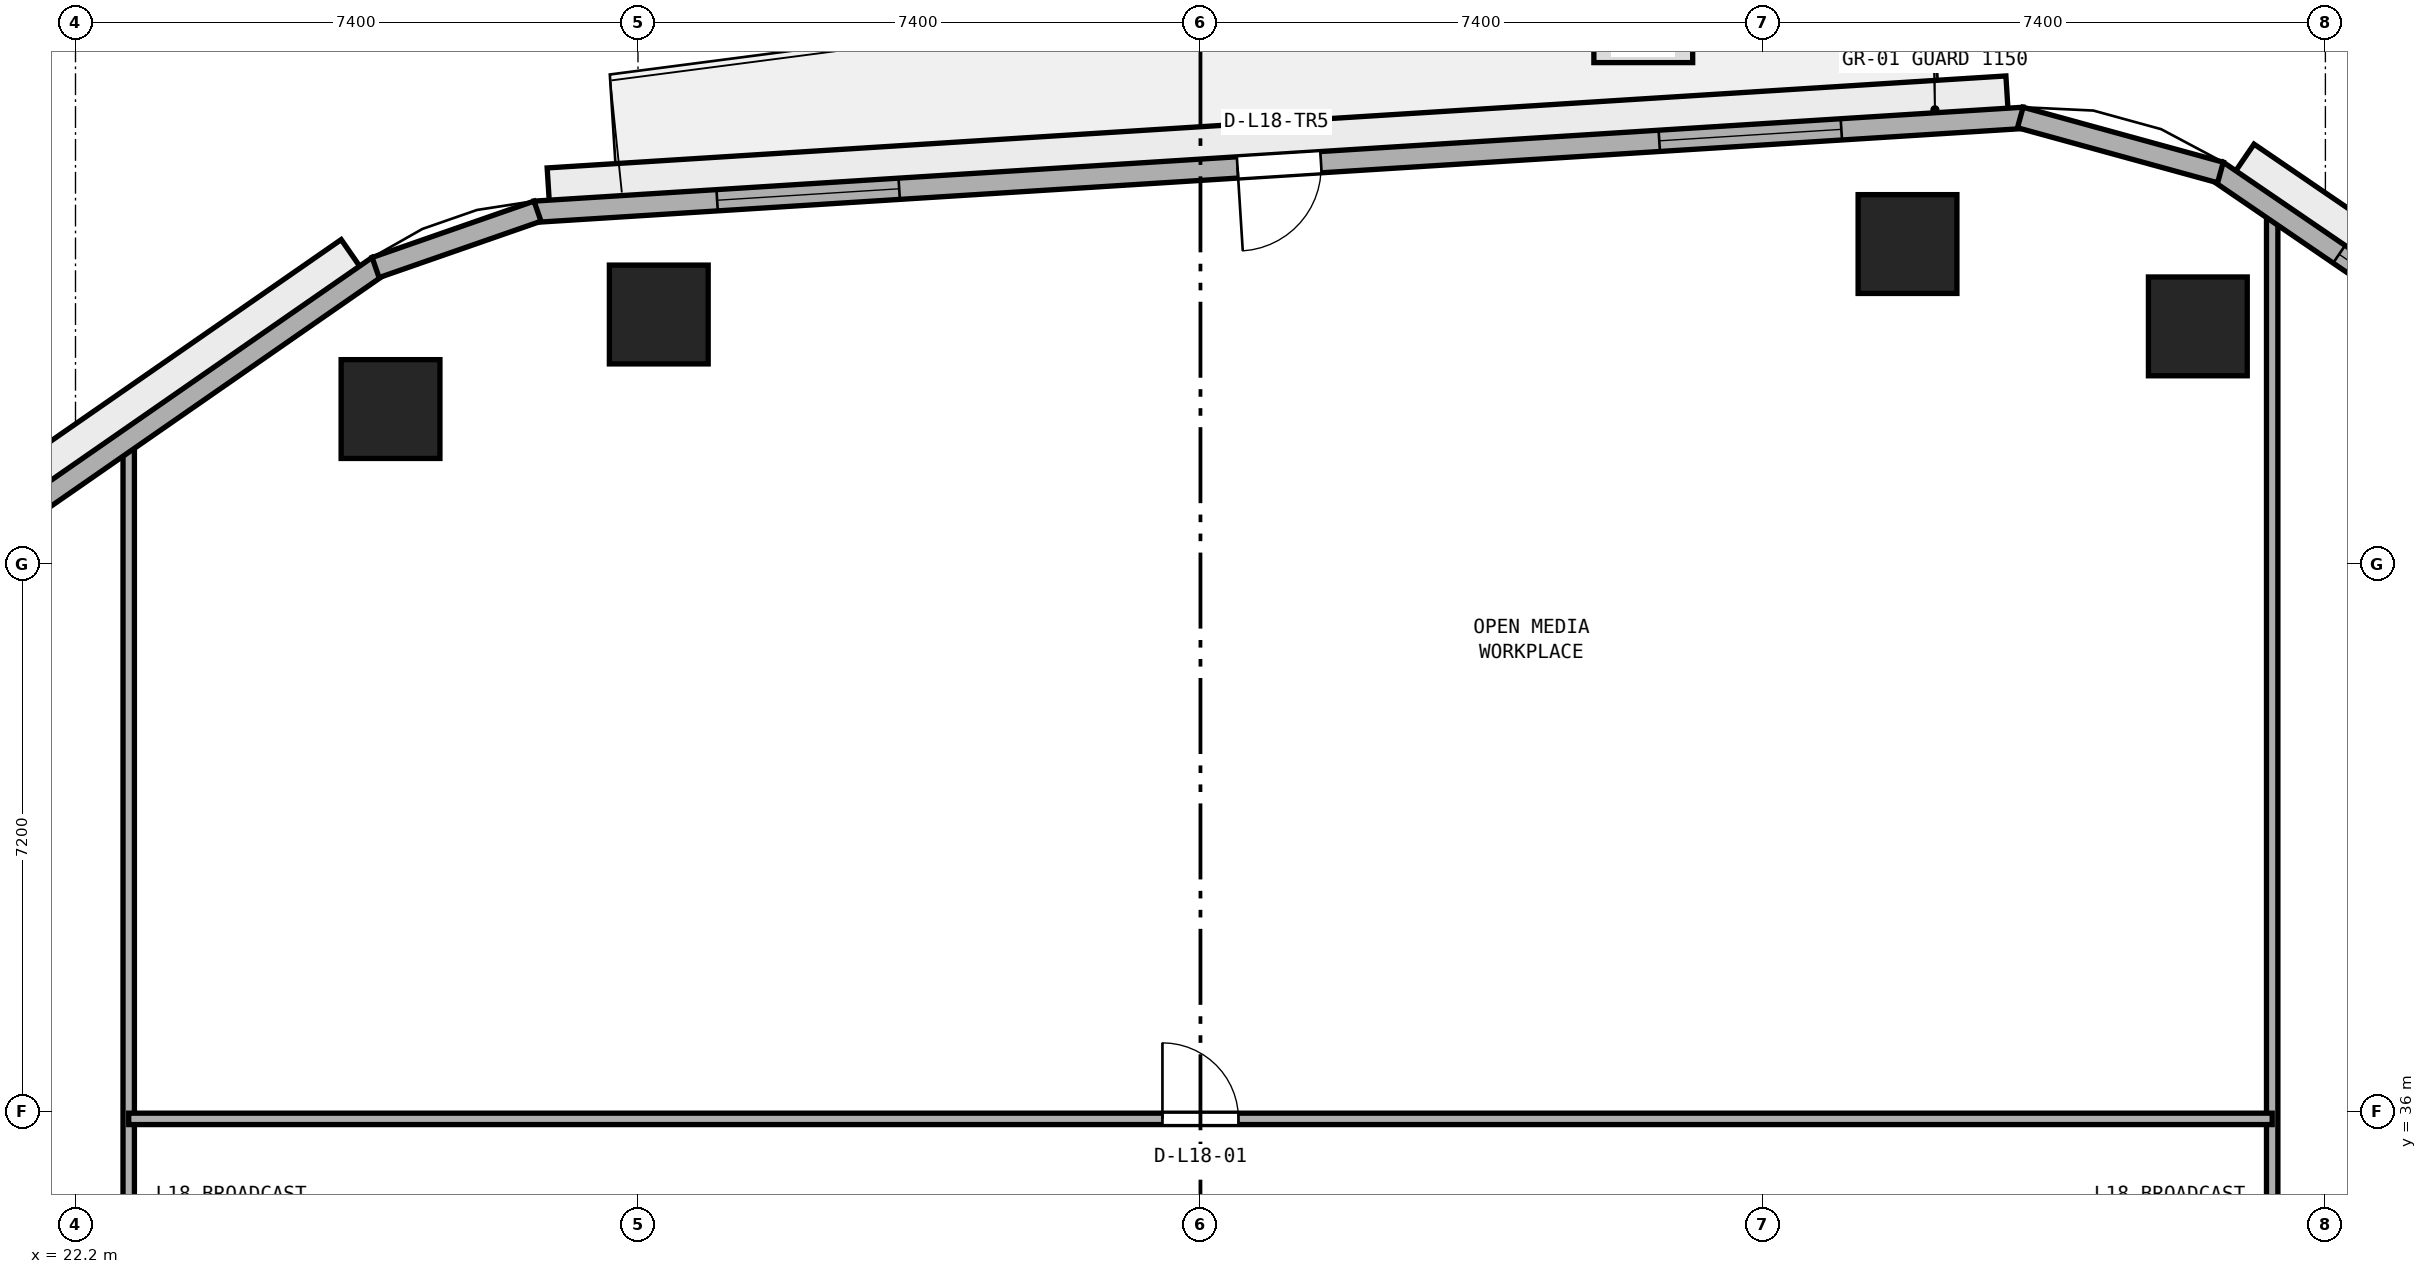
"""IFC4 building model, lengths in metres.
Left out: names, types, materials, properties, quantities, classifications, styles, units other than length and angle.
Written with IfcOpenShell. Run it as: python <this file> out.ifc"""

import sys

from ifc_helpers import new_model, si_unit, direction, frame, frame_2d, origin, origin_2d, place, context, subcontext, project, spatial, rectangle, extrude, element, fill, save


model = new_model("IFC4")
c1 = context("Model", 3, precision=1e-05, world=origin(), true_north=direction((0.0, 1.0)))
c2 = subcontext(c1, "Body", "Model", "MODEL_VIEW")
j1 = project(units=[si_unit("LENGTHUNIT", "METRE"), si_unit("PLANEANGLEUNIT", "RADIAN")], contexts=[c1])
p1 = place(None, origin())
s1 = spatial("IfcSite", under=j1, at=p1, CompositionType="ELEMENT")
p2 = place(p1, origin())
s2 = spatial("IfcBuilding", under=s1, at=p2, CompositionType="ELEMENT")
p3 = place(p2, frame((0.0, 0.0, 74.4)))
s3 = spatial("IfcBuildingStorey", under=s2, at=p3, CompositionType="ELEMENT", Elevation=74.4)
for number, where, z_axis, x_axis in (
    (1, (50.122, 46.326, 0.0), (0.0, 0.0, 1.0), (1.0, 0.0, 0.0)),
    (2, (46.302, 47.409, 0.0), (0.0, 0.0, 1.0), (1.0, 0.0, 0.0)),
    (3, (29.874, 46.482, 0.0), (0.0, 0.0, 1.0), (1.0, 0.0, 0.0)),
    (4, (26.344, 45.238, 0.0), (0.0, 0.0, 1.0), (1.0, 0.0, 0.0)),
):
    element("IfcColumn", number, at=place(p3, frame(where, z_axis=z_axis, x_axis=x_axis)), inside=s3, PredefinedType="COLUMN", context=c2, shape_type="SweptSolid", body=[
        extrude(rectangle(XDim=1.3, YDim=1.3, at=origin_2d()), origin(), (0.0, 0.0, 1.0), 3.8),
    ])
p4 = place(p3, frame((51.1, 2.651, 0.0), z_axis=(0.0, 0.0, 1.0), x_axis=(0.0, 1.0, 0.0)))
e5 = element("IfcWall", 5, at=p4, inside=s3, PredefinedType="PARTITIONING", context=c2, shape_type="SweptSolid", body=[
    extrude(rectangle(XDim=45.255, YDim=0.15, at=frame_2d((22.627, 0.0))), origin(), (0.0, 0.0, 1.0), 3.525),
])
p5 = place(p4, frame((15.699, 0.0, 0.0)))
e6 = element("IfcOpeningElement", 6, at=p5, cuts=e5, PredefinedType="OPENING", context=c2, shape_type="SweptSolid", body=[
    extrude(rectangle(XDim=0.9, YDim=2.1, at=frame_2d((0.45, 1.05))), frame((0.0, 0.085, 0.0), z_axis=(0.0, -1.0, 0.0), x_axis=(1.0, 0.0, 0.0)), (0.0, 0.0, 1.0), 0.17),
])
p6 = place(p4, frame((26.349, 0.0, 0.0)))
e7 = element("IfcOpeningElement", 7, at=p6, cuts=e5, PredefinedType="OPENING", context=c2, shape_type="SweptSolid", body=[
    extrude(rectangle(XDim=1.0, YDim=2.12, at=frame_2d((0.5, 1.06))), frame((0.0, 0.085, 0.0), z_axis=(0.0, -1.0, 0.0), x_axis=(1.0, 0.0, 0.0)), (0.0, 0.0, 1.0), 0.17),
])
p7 = place(p3, frame((22.9, 5.316, 0.0), z_axis=(0.0, 0.0, 1.0), x_axis=(0.0, 1.0, 0.0)))
e8 = element("IfcWall", 8, at=p7, inside=s3, PredefinedType="PARTITIONING", context=c2, shape_type="SweptSolid", body=[
    extrude(rectangle(XDim=39.555, YDim=0.15, at=frame_2d((19.777, 0.0))), origin(), (0.0, 0.0, 1.0), 3.525),
])
p8 = place(p7, frame((12.135, 0.0, 0.0)))
e9 = element("IfcOpeningElement", 9, at=p8, cuts=e8, PredefinedType="OPENING", context=c2, shape_type="SweptSolid", body=[
    extrude(rectangle(XDim=0.9, YDim=2.1, at=frame_2d((0.45, 1.05))), frame((0.0, 0.085, 0.0), z_axis=(0.0, -1.0, 0.0), x_axis=(1.0, 0.0, 0.0)), (0.0, 0.0, 1.0), 0.17),
])
p9 = place(p7, frame((22.834, 0.0, 0.0)))
e10 = element("IfcOpeningElement", 10, at=p9, cuts=e8, PredefinedType="OPENING", context=c2, shape_type="SweptSolid", body=[
    extrude(rectangle(XDim=0.9, YDim=2.1, at=frame_2d((0.45, 1.05))), frame((0.0, 0.085, 0.0), z_axis=(0.0, -1.0, 0.0), x_axis=(1.0, 0.0, 0.0)), (0.0, 0.0, 1.0), 0.17),
])
p10 = place(p3, frame((22.9, 35.9, 0.0), z_axis=(0.0, 0.0, 1.0), x_axis=(1.0, 0.0, 0.0)))
e11 = element("IfcWall", 11, at=p10, inside=s3, PredefinedType="PARTITIONING", context=c2, shape_type="SweptSolid", body=[
    extrude(rectangle(XDim=28.2, YDim=0.15, at=frame_2d((14.1, 0.0))), origin(), (0.0, 0.0, 1.0), 3.525),
])
p11 = place(p10, frame((13.6, 0.0, 0.0)))
e12 = element("IfcOpeningElement", 12, at=p11, cuts=e11, PredefinedType="OPENING", context=c2, shape_type="SweptSolid", body=[
    extrude(rectangle(XDim=1.0, YDim=2.12, at=frame_2d((0.5, 1.06))), frame((0.0, 0.085, 0.0), z_axis=(0.0, -1.0, 0.0), x_axis=(1.0, 0.0, 0.0)), (0.0, 0.0, 1.0), 0.17),
])
p12 = place(p3, frame((64.29, 38.867, 0.0), z_axis=(0.0, 0.0, 1.0), x_axis=(-0.825755550159, 0.564028165416, 0.0)))
e13 = element("IfcWall", 13, at=p12, inside=s3, PredefinedType="STANDARD", context=c2, shape_type="SweptSolid", body=[
    extrude(rectangle(XDim=16.848, YDim=0.28, at=frame_2d((8.424, 0.0))), origin(), (0.0, 0.0, 1.0), 3.525),
])
p13 = place(p12, frame((1.941, 0.0, 0.9)))
e14 = element("IfcOpeningElement", 14, at=p13, cuts=e13, PredefinedType="OPENING", context=c2, shape_type="SweptSolid", body=[
    extrude(rectangle(XDim=2.4, YDim=1.75, at=frame_2d((1.2, 0.875))), frame((0.0, 0.15, 0.0), z_axis=(0.0, -1.0, 0.0), x_axis=(1.0, 0.0, 0.0)), (0.0, 0.0, 1.0), 0.3),
])
p14 = place(p12, frame((7.224, 0.0, 0.9)))
e15 = element("IfcOpeningElement", 15, at=p14, cuts=e13, PredefinedType="OPENING", context=c2, shape_type="SweptSolid", body=[
    extrude(rectangle(XDim=2.4, YDim=1.75, at=frame_2d((1.2, 0.875))), frame((0.0, 0.15, 0.0), z_axis=(0.0, -1.0, 0.0), x_axis=(1.0, 0.0, 0.0)), (0.0, 0.0, 1.0), 0.3),
])
p15 = place(p12, frame((12.507, 0.0, 0.9)))
e16 = element("IfcOpeningElement", 16, at=p15, cuts=e13, PredefinedType="OPENING", context=c2, shape_type="SweptSolid", body=[
    extrude(rectangle(XDim=2.4, YDim=1.75, at=frame_2d((1.2, 0.875))), frame((0.0, 0.15, 0.0), z_axis=(0.0, -1.0, 0.0), x_axis=(1.0, 0.0, 0.0)), (0.0, 0.0, 1.0), 0.3),
])
p16 = place(p3, frame((47.832, 49.069, 0.0), z_axis=(0.0, 0.0, 1.0), x_axis=(-0.998017725054, -0.062933460723, 0.0)))
e17 = element("IfcWall", 17, at=p16, inside=s3, PredefinedType="STANDARD", context=c2, shape_type="SweptSolid", body=[
    extrude(rectangle(XDim=19.629, YDim=0.28, at=frame_2d((9.815, 0.0))), origin(), (0.0, 0.0, 1.0), 3.525),
])
p17 = place(p16, frame((9.265, 0.0, 0.0)))
e18 = element("IfcOpeningElement", 18, at=p17, cuts=e17, PredefinedType="OPENING", context=c2, shape_type="SweptSolid", body=[
    extrude(rectangle(XDim=1.1, YDim=2.2, at=frame_2d((0.55, 1.1))), frame((0.0, 0.15, 0.0), z_axis=(0.0, -1.0, 0.0), x_axis=(1.0, 0.0, 0.0)), (0.0, 0.0, 1.0), 0.3),
])
p18 = place(p16, frame((2.405, 0.0, 0.9)))
e19 = element("IfcOpeningElement", 19, at=p18, cuts=e17, PredefinedType="OPENING", context=c2, shape_type="SweptSolid", body=[
    extrude(rectangle(XDim=2.4, YDim=1.75, at=frame_2d((1.2, 0.875))), frame((0.0, 0.15, 0.0), z_axis=(0.0, -1.0, 0.0), x_axis=(1.0, 0.0, 0.0)), (0.0, 0.0, 1.0), 0.3),
])
p19 = place(p16, frame((14.825, 0.0, 0.9)))
e20 = element("IfcOpeningElement", 20, at=p19, cuts=e17, PredefinedType="OPENING", context=c2, shape_type="SweptSolid", body=[
    extrude(rectangle(XDim=2.4, YDim=1.75, at=frame_2d((1.2, 0.875))), frame((0.0, 0.15, 0.0), z_axis=(0.0, -1.0, 0.0), x_axis=(1.0, 0.0, 0.0)), (0.0, 0.0, 1.0), 0.3),
])
p20 = place(p3, frame((26.182, 47.118, 0.0), z_axis=(0.0, 0.0, 1.0), x_axis=(-0.821547956627, -0.570139417127, 0.0)))
e21 = element("IfcWall", 21, at=p20, inside=s3, PredefinedType="STANDARD", context=c2, shape_type="SweptSolid", body=[
    extrude(rectangle(XDim=18.132, YDim=0.28, at=frame_2d((9.066, 0.0))), origin(), (0.0, 0.0, 1.0), 3.525),
])
p21 = place(p20, frame((7.866, 0.0, 0.9)))
e22 = element("IfcOpeningElement", 22, at=p21, cuts=e21, PredefinedType="OPENING", context=c2, shape_type="SweptSolid", body=[
    extrude(rectangle(XDim=2.4, YDim=1.75, at=frame_2d((1.2, 0.875))), frame((0.0, 0.15, 0.0), z_axis=(0.0, -1.0, 0.0), x_axis=(1.0, 0.0, 0.0)), (0.0, 0.0, 1.0), 0.3),
])
p22 = place(p20, frame((13.577, 0.0, 0.9)))
e23 = element("IfcOpeningElement", 23, at=p22, cuts=e21, PredefinedType="OPENING", context=c2, shape_type="SweptSolid", body=[
    extrude(rectangle(XDim=2.4, YDim=1.75, at=frame_2d((1.2, 0.875))), frame((0.0, 0.15, 0.0), z_axis=(0.0, -1.0, 0.0), x_axis=(1.0, 0.0, 0.0)), (0.0, 0.0, 1.0), 0.3),
])
p23 = place(p3, frame((50.419, 48.351, 0.0), z_axis=(0.0, 0.0, 1.0), x_axis=(-0.964254516967, 0.264977784933, 0.0)))
e24 = element("IfcWall", 24, at=p23, inside=s3, PredefinedType="STANDARD", context=c2, shape_type="SweptSolid", body=[
    extrude(rectangle(XDim=2.731, YDim=0.28, at=frame_2d((1.365, 0.0))), origin(), (0.0, 0.0, 1.0), 3.525),
])
p24 = place(p3, frame((28.278, 47.842, 0.0), z_axis=(0.0, 0.0, 1.0), x_axis=(-0.9444559001, -0.328638179106, 0.0)))
e25 = element("IfcWall", 25, at=p24, inside=s3, PredefinedType="STANDARD", context=c2, shape_type="SweptSolid", body=[
    extrude(rectangle(XDim=2.255, YDim=0.28, at=frame_2d((1.128, 0.0))), origin(), (0.0, 0.0, 1.0), 3.525),
])
p25 = place(p11, origin())
e26 = element("IfcDoor", 26, at=p25, inside=s3, OperationType="SINGLE_SWING_LEFT", PredefinedType="DOOR", context=c2, shape_type="SweptSolid", body=[
    extrude(rectangle(XDim=1.0, YDim=2.12, at=frame_2d((0.5, 1.06))), frame((0.0, 0.025, 0.0), z_axis=(0.0, -1.0, 0.0), x_axis=(1.0, 0.0, 0.0)), (0.0, 0.0, 1.0), 0.05),
])
fill(e12, e26)
p26 = place(p15, origin())
e27 = element("IfcWindow", 27, at=p26, inside=s3, PartitioningType="SINGLE_PANEL", PredefinedType="WINDOW", context=c2, shape_type="SweptSolid", body=[
    extrude(rectangle(XDim=2.4, YDim=1.75, at=frame_2d((1.2, 0.875))), frame((0.0, 0.03, 0.0), z_axis=(0.0, -1.0, 0.0), x_axis=(1.0, 0.0, 0.0)), (0.0, 0.0, 1.0), 0.06),
])
fill(e16, e27)
p27 = place(p17, origin())
e28 = element("IfcDoor", 28, at=p27, inside=s3, OperationType="SINGLE_SWING_RIGHT", PredefinedType="DOOR", context=c2, shape_type="SweptSolid", body=[
    extrude(rectangle(XDim=1.1, YDim=2.2, at=frame_2d((0.55, 1.1))), frame((0.0, 0.025, 0.0), z_axis=(0.0, -1.0, 0.0), x_axis=(1.0, 0.0, 0.0)), (0.0, 0.0, 1.0), 0.05),
])
fill(e18, e28)
p28 = place(p18, origin())
e29 = element("IfcWindow", 29, at=p28, inside=s3, PartitioningType="SINGLE_PANEL", PredefinedType="WINDOW", context=c2, shape_type="SweptSolid", body=[
    extrude(rectangle(XDim=2.4, YDim=1.75, at=frame_2d((1.2, 0.875))), frame((0.0, 0.03, 0.0), z_axis=(0.0, -1.0, 0.0), x_axis=(1.0, 0.0, 0.0)), (0.0, 0.0, 1.0), 0.06),
])
fill(e19, e29)
p29 = place(p19, origin())
e30 = element("IfcWindow", 30, at=p29, inside=s3, PartitioningType="SINGLE_PANEL", PredefinedType="WINDOW", context=c2, shape_type="SweptSolid", body=[
    extrude(rectangle(XDim=2.4, YDim=1.75, at=frame_2d((1.2, 0.875))), frame((0.0, 0.03, 0.0), z_axis=(0.0, -1.0, 0.0), x_axis=(1.0, 0.0, 0.0)), (0.0, 0.0, 1.0), 0.06),
])
fill(e20, e30)
save(model, sys.argv[1])
